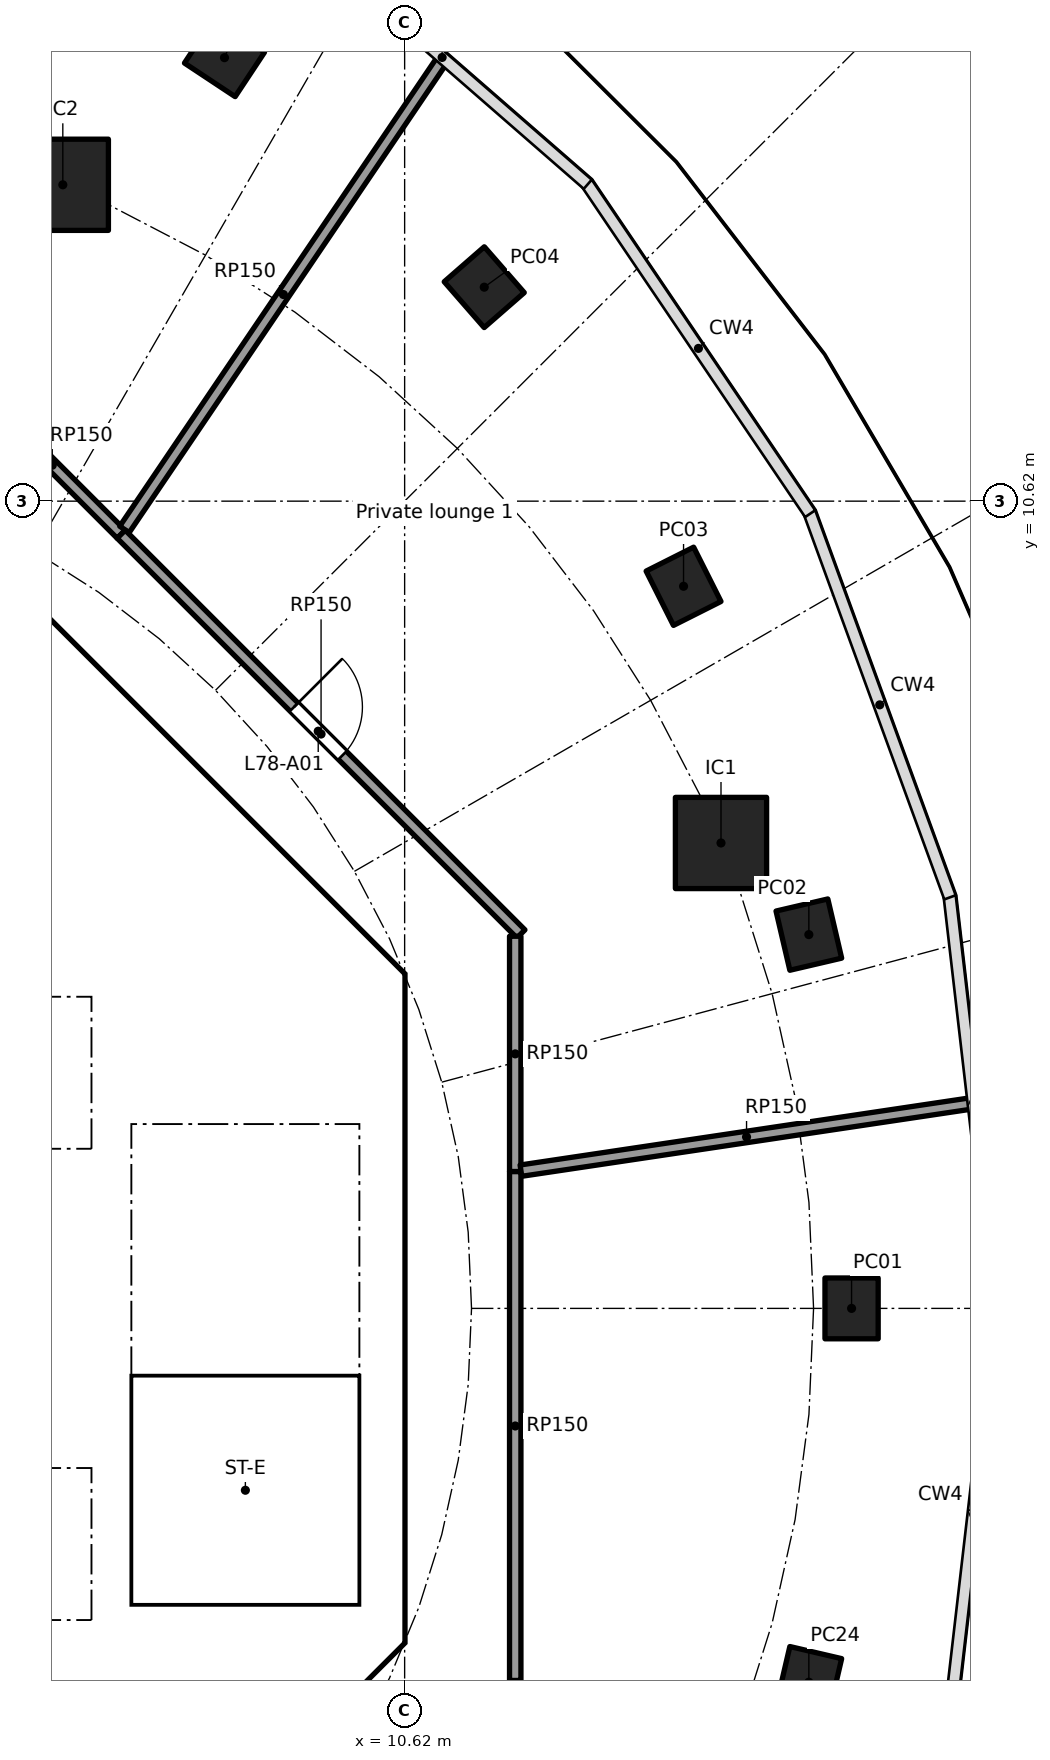
"""IFC4 building model, lengths in metres.
Left out: names, types, materials, properties, quantities, classifications, styles, units other than length and angle.
Written with IfcOpenShell. Run it as: python <this file> out.ifc"""

import sys

from ifc_helpers import new_model, si_unit, direction, frame, frame_2d, origin, origin_2d, place, context, subcontext, project, spatial, polyline, rectangle, hollow_rectangle, outline, extrude, element, fill, save


model = new_model("IFC4")
c1 = context("Model", 3, precision=1e-05, world=origin(), true_north=direction((0.0, 1.0)))
c2 = subcontext(c1, "Body", "Model", "MODEL_VIEW")
j1 = project(units=[si_unit("LENGTHUNIT", "METRE"), si_unit("PLANEANGLEUNIT", "RADIAN")], contexts=[c1])
p1 = place(None, origin())
s1 = spatial("IfcSite", under=j1, at=p1, CompositionType="ELEMENT")
p2 = place(p1, origin())
s2 = spatial("IfcBuilding", under=s1, at=p2, CompositionType="ELEMENT")
p3 = place(p2, frame((0.0, 0.0, 315.9)))
s3 = spatial("IfcBuildingStorey", under=s2, at=p3, CompositionType="ELEMENT", Elevation=315.9)
for number, where, z_axis, x_axis in (
    (1, (16.5, 0.0, -0.3), (0.0, 0.0, 1.0), (0.0, 1.0, 0.0)),
    (2, (15.938, 4.917, -0.3), (0.0, 0.0, 1.0), (-0.227, 0.974, 0.0)),
    (3, (14.289, 9.5, -0.3), (0.0, 0.0, 1.0), (-0.45, 0.893, 0.0)),
    (4, (11.667, 13.435, -0.3), (0.0, 0.0, 1.0), (-0.657, 0.754, 0.0)),
    (5, (8.25, 16.455, -0.3), (0.0, 0.0, 1.0), (-0.834, 0.552, 0.0)),
    (6, (15.938, -4.917, -0.3), (0.0, 0.0, 1.0), (0.227, 0.974, 0.0)),
):
    element("IfcColumn", number, at=place(p3, frame(where, z_axis=z_axis, x_axis=x_axis)), inside=s3, PredefinedType="COLUMN", context=c2, shape_type="SweptSolid", body=[
        extrude(hollow_rectangle(XDim=0.8, YDim=0.7, WallThickness=0.025, at=origin_2d()), origin(), (0.0, 0.0, 1.0), 4.8),
    ])
for number, where, z_axis, x_axis in (
    (7, (14.782, 6.123, 0.0), (0.0, 0.0, 1.0), (1.0, 0.0, 0.0)),
    (8, (6.123, 14.782, 0.0), (0.0, 0.0, 1.0), (1.0, 0.0, 0.0)),
):
    element("IfcColumn", number, at=place(p3, frame(where, z_axis=z_axis, x_axis=x_axis)), inside=s3, PredefinedType="COLUMN", context=c2, shape_type="SweptSolid", body=[
        extrude(rectangle(XDim=1.2, YDim=1.2, at=origin_2d()), origin(), (0.0, 0.0, 1.0), 4.5),
    ])
p4 = place(p3, frame((9.988, 4.613, 0.0), z_axis=(0.0, 0.0, 1.0), x_axis=(-0.707106781187, 0.707106781187, 0.0)))
e9 = element("IfcWall", 9, at=p4, inside=s3, PredefinedType="SHEAR", context=c2, shape_type="SweptSolid", body=[
    extrude(rectangle(XDim=7.602, YDim=0.6, at=frame_2d((3.801, 0.0))), origin(), (0.0, 0.0, 1.0), 4.2),
])
p5 = place(p4, frame((3.201, 0.0, 0.0)))
e10 = element("IfcOpeningElement", 10, at=p5, cuts=e9, PredefinedType="OPENING", context=c2, shape_type="SweptSolid", body=[
    extrude(rectangle(XDim=1.2, YDim=2.1, at=frame_2d((0.6, 1.05))), frame((0.0, 0.31, 0.0), z_axis=(0.0, -1.0, 0.0), x_axis=(1.0, 0.0, 0.0)), (0.0, 0.0, 1.0), 0.62),
])
p6 = place(p3, frame((4.613, -9.988, 0.0), z_axis=(0.0, 0.0, 1.0), x_axis=(0.707106781187, 0.707106781187, 0.0)))
e11 = element("IfcWall", 11, at=p6, inside=s3, PredefinedType="SHEAR", context=c2, shape_type="SweptSolid", body=[
    extrude(rectangle(XDim=7.602, YDim=0.6, at=frame_2d((3.801, 0.0))), origin(), (0.0, 0.0, 1.0), 4.2),
])
p7 = place(p6, frame((3.201, 0.0, 0.0)))
e12 = element("IfcOpeningElement", 12, at=p7, cuts=e11, PredefinedType="OPENING", context=c2, shape_type="SweptSolid", body=[
    extrude(rectangle(XDim=1.2, YDim=2.1, at=frame_2d((0.6, 1.05))), frame((0.0, 0.31, 0.0), z_axis=(0.0, -1.0, 0.0), x_axis=(1.0, 0.0, 0.0)), (0.0, 0.0, 1.0), 0.62),
])
p8 = place(p3, frame((-6.7, 2.0, 0.0), z_axis=(0.0, 0.0, 1.0), x_axis=(1.0, 0.0, 0.0)))
e13 = element("IfcWall", 13, at=p8, inside=s3, PredefinedType="SOLIDWALL", context=c2, shape_type="SweptSolid", body=[
    extrude(rectangle(XDim=13.4, YDim=0.2, at=frame_2d((6.7, 0.0))), origin(), (0.0, 0.0, 1.0), 4.2),
])
p9 = place(p8, frame((11.65, 0.0, 0.0)))
e14 = element("IfcOpeningElement", 14, at=p9, cuts=e13, PredefinedType="OPENING", context=c2, shape_type="SweptSolid", body=[
    extrude(rectangle(XDim=1.1, YDim=2.1, at=frame_2d((0.55, 1.05))), frame((0.0, 0.11, 0.0), z_axis=(0.0, -1.0, 0.0), x_axis=(1.0, 0.0, 0.0)), (0.0, 0.0, 1.0), 0.22),
])
p10 = place(p8, frame((0.75, 0.0, 0.0)))
e15 = element("IfcOpeningElement", 15, at=p10, cuts=e13, PredefinedType="OPENING", context=c2, shape_type="SweptSolid", body=[
    extrude(rectangle(XDim=0.9, YDim=2.1, at=frame_2d((0.45, 1.05))), frame((0.0, 0.11, 0.0), z_axis=(0.0, -1.0, 0.0), x_axis=(1.0, 0.0, 0.0)), (0.0, 0.0, 1.0), 0.22),
])
p11 = place(p8, frame((4.05, 0.0, 0.0)))
e16 = element("IfcOpeningElement", 16, at=p11, cuts=e13, PredefinedType="OPENING", context=c2, shape_type="SweptSolid", body=[
    extrude(rectangle(XDim=0.9, YDim=2.1, at=frame_2d((0.45, 1.05))), frame((0.0, 0.11, 0.0), z_axis=(0.0, -1.0, 0.0), x_axis=(1.0, 0.0, 0.0)), (0.0, 0.0, 1.0), 0.22),
])
p12 = place(p8, frame((7.35, 0.0, 0.0)))
e17 = element("IfcOpeningElement", 17, at=p12, cuts=e13, PredefinedType="OPENING", context=c2, shape_type="SweptSolid", body=[
    extrude(rectangle(XDim=0.9, YDim=2.1, at=frame_2d((0.45, 1.05))), frame((0.0, 0.11, 0.0), z_axis=(0.0, -1.0, 0.0), x_axis=(1.0, 0.0, 0.0)), (0.0, 0.0, 1.0), 0.22),
])
p13 = place(p8, frame((9.55, 0.0, 0.0)))
e18 = element("IfcOpeningElement", 18, at=p13, cuts=e13, PredefinedType="OPENING", context=c2, shape_type="SweptSolid", body=[
    extrude(rectangle(XDim=0.9, YDim=2.1, at=frame_2d((0.45, 1.05))), frame((0.0, 0.11, 0.0), z_axis=(0.0, -1.0, 0.0), x_axis=(1.0, 0.0, 0.0)), (0.0, 0.0, 1.0), 0.22),
])
p14 = place(p3, frame((6.7, 4.0, 0.0), z_axis=(0.0, 0.0, 1.0), x_axis=(1.0, 0.0, 0.0)))
e19 = element("IfcWall", 19, at=p14, inside=s3, PredefinedType="SOLIDWALL", context=c2, shape_type="SweptSolid", body=[
    extrude(rectangle(XDim=3.325, YDim=0.2, at=frame_2d((1.662, 0.0))), origin(), (0.0, 0.0, 1.0), 4.2),
])
p15 = place(p14, frame((1.25, 0.0, 0.0)))
e20 = element("IfcOpeningElement", 20, at=p15, cuts=e19, PredefinedType="OPENING", context=c2, shape_type="SweptSolid", body=[
    extrude(rectangle(XDim=1.1, YDim=2.1, at=frame_2d((0.55, 1.05))), frame((0.0, 0.11, 0.0), z_axis=(0.0, -1.0, 0.0), x_axis=(1.0, 0.0, 0.0)), (0.0, 0.0, 1.0), 0.22),
])
p16 = place(p3, frame((-6.7, -2.0, 0.0), z_axis=(0.0, 0.0, 1.0), x_axis=(1.0, 0.0, 0.0)))
e21 = element("IfcWall", 21, at=p16, inside=s3, PredefinedType="SOLIDWALL", context=c2, shape_type="SweptSolid", body=[
    extrude(rectangle(XDim=13.4, YDim=0.2, at=frame_2d((6.7, 0.0))), origin(), (0.0, 0.0, 1.0), 4.2),
])
p17 = place(p16, frame((9.45, 0.0, 0.0)))
e22 = element("IfcOpeningElement", 22, at=p17, cuts=e21, PredefinedType="OPENING", context=c2, shape_type="SweptSolid", body=[
    extrude(rectangle(XDim=1.1, YDim=2.1, at=frame_2d((0.55, 1.05))), frame((0.0, 0.11, 0.0), z_axis=(0.0, -1.0, 0.0), x_axis=(1.0, 0.0, 0.0)), (0.0, 0.0, 1.0), 0.22),
])
p18 = place(p16, frame((11.65, 0.0, 0.0)))
e23 = element("IfcOpeningElement", 23, at=p18, cuts=e21, PredefinedType="OPENING", context=c2, shape_type="SweptSolid", body=[
    extrude(rectangle(XDim=1.1, YDim=2.1, at=frame_2d((0.55, 1.05))), frame((0.0, 0.11, 0.0), z_axis=(0.0, -1.0, 0.0), x_axis=(1.0, 0.0, 0.0)), (0.0, 0.0, 1.0), 0.22),
])
p19 = place(p16, frame((1.85, 0.0, 0.0)))
e24 = element("IfcOpeningElement", 24, at=p19, cuts=e21, PredefinedType="OPENING", context=c2, shape_type="SweptSolid", body=[
    extrude(rectangle(XDim=0.9, YDim=2.1, at=frame_2d((0.45, 1.05))), frame((0.0, 0.11, 0.0), z_axis=(0.0, -1.0, 0.0), x_axis=(1.0, 0.0, 0.0)), (0.0, 0.0, 1.0), 0.22),
])
p20 = place(p16, frame((6.25, 0.0, 0.0)))
e25 = element("IfcOpeningElement", 25, at=p20, cuts=e21, PredefinedType="OPENING", context=c2, shape_type="SweptSolid", body=[
    extrude(rectangle(XDim=0.9, YDim=2.1, at=frame_2d((0.45, 1.05))), frame((0.0, 0.11, 0.0), z_axis=(0.0, -1.0, 0.0), x_axis=(1.0, 0.0, 0.0)), (0.0, 0.0, 1.0), 0.22),
])
p21 = place(p3, origin())
e26 = element("IfcWall", 26, at=p21, inside=s3, PredefinedType="SHEAR", context=c2, shape_type="SweptSolid", body=[
    extrude(outline(polyline([(9.776, -4.401), (10.025, -4.152), (10.025, -3.801), (10.025, 4.152), (9.776, 4.401), (10.2, 4.825), (10.625, 4.401), (10.625, -4.401), (10.2, -4.825), (9.776, -4.401)])), origin(), (0.0, 0.0, 1.0), 4.2),
])
p22 = place(p3, origin())
e27 = element("IfcWall", 27, at=p22, inside=s3, PredefinedType="SOLIDWALL", context=c2, shape_type="SweptSolid", body=[
    extrude(outline(polyline([(-6.7, 4.3), (6.7, 4.3), (6.7, 2.1), (6.5, 2.1), (6.5, 4.1), (4.5, 4.1), (4.5, 2.1), (4.3, 2.1), (4.3, 4.1), (2.3, 4.1), (2.3, 2.1), (2.1, 2.1), (2.1, 4.1), (0.1, 4.1), (0.1, 2.1), (-0.1, 2.1), (-0.1, 4.1), (-4.3, 4.1), (-4.3, 2.1), (-4.5, 2.1), (-4.5, 4.1), (-6.5, 4.1), (-6.5, 2.1), (-6.7, 2.1), (-6.7, 4.3)])), origin(), (0.0, 0.0, 1.0), 4.2),
])
p23 = place(p3, origin())
e28 = element("IfcWall", 28, at=p23, inside=s3, PredefinedType="SOLIDWALL", context=c2, shape_type="SweptSolid", body=[
    extrude(outline(polyline([(-6.7, -2.1), (-6.5, -2.1), (-6.5, -4.1), (-2.3, -4.1), (-2.3, -2.1), (-2.1, -2.1), (-2.1, -4.1), (2.1, -4.1), (2.1, -2.1), (2.3, -2.1), (2.3, -4.1), (4.3, -4.1), (4.3, -2.1), (4.5, -2.1), (4.5, -4.1), (6.5, -4.1), (6.5, -2.1), (6.7, -2.1), (6.7, -4.3), (-6.7, -4.3), (-6.7, -2.1)])), origin(), (0.0, 0.0, 1.0), 4.2),
])
p24 = place(p3, origin())
e29 = element("IfcWall", 29, at=p24, inside=s3, PredefinedType="SOLIDWALL", context=c2, shape_type="SweptSolid", body=[
    extrude(outline(polyline([(7.025, -3.9), (6.7, -3.9), (6.7, 3.9), (7.025, 3.9), (7.025, -3.9)])), origin(), (0.0, 0.0, 1.0), 4.2),
])
p25 = place(p3, origin())
e30 = element("IfcWall", 30, at=p25, inside=s3, PredefinedType="SOLIDWALL", context=c2, shape_type="SweptSolid", body=[
    extrude(outline(polyline([(10.025, -4.1), (6.7, -4.1), (6.7, -3.9), (10.025, -3.9), (10.025, -4.1)])), origin(), (0.0, 0.0, 1.0), 4.2),
])
p26 = place(p3, frame((5.077, 12.0, 0.0), z_axis=(0.0, 0.0, 1.0), x_axis=(0.706964061082, -0.707249472491, 0.0)))
e31 = element("IfcWall", 31, at=p26, inside=s3, PredefinedType="PARTITIONING", context=c2, shape_type="SweptSolid", body=[
    extrude(rectangle(XDim=2.566, YDim=0.15, at=frame_2d((1.283, 0.0))), origin(), (0.0, 0.0, 1.0), 4.2),
])
p27 = place(p3, frame((6.934, 10.248, 0.0), z_axis=(0.0, 0.0, 1.0), x_axis=(0.56046251301, 0.828179794194, 0.0)))
e32 = element("IfcWall", 32, at=p27, inside=s3, PredefinedType="PARTITIONING", context=c2, shape_type="SweptSolid", body=[
    extrude(rectangle(XDim=7.462, YDim=0.15, at=frame_2d((3.731, 0.0))), origin(), (0.0, 0.0, 1.0), 4.2),
])
p28 = place(p3, frame((6.891, 10.185, 0.0), z_axis=(0.0, 0.0, 1.0), x_axis=(0.70715602432, -0.707057534623, 0.0)))
e33 = element("IfcWall", 33, at=p28, inside=s3, PredefinedType="PARTITIONING", context=c2, shape_type="SweptSolid", body=[
    extrude(rectangle(XDim=7.437, YDim=0.15, at=frame_2d((3.718, 0.0))), origin(), (0.0, 0.0, 1.0), 4.2),
])
p29 = place(p28, frame((3.215, 0.0, 0.0)))
e34 = element("IfcOpeningElement", 34, at=p29, cuts=e33, PredefinedType="OPENING", context=c2, shape_type="SweptSolid", body=[
    extrude(rectangle(XDim=0.9, YDim=2.1, at=frame_2d((0.45, 1.05))), frame((0.0, 0.085, 0.0), z_axis=(0.0, -1.0, 0.0), x_axis=(1.0, 0.0, 0.0)), (0.0, 0.0, 1.0), 0.17),
])
p30 = place(p3, frame((12.15, -4.926, 0.0), z_axis=(0.0, 0.0, 1.0), x_axis=(-0.707057968072, -0.707155590932, 0.0)))
e35 = element("IfcWall", 35, at=p30, inside=s3, PredefinedType="PARTITIONING", context=c2, shape_type="SweptSolid", body=[
    extrude(rectangle(XDim=10.003, YDim=0.15, at=frame_2d((5.002, 0.0))), origin(), (0.0, 0.0, 1.0), 4.2),
])
p31 = place(p30, frame((4.658, 0.0, 0.0)))
e36 = element("IfcOpeningElement", 36, at=p31, cuts=e35, PredefinedType="OPENING", context=c2, shape_type="SweptSolid", body=[
    extrude(rectangle(XDim=0.9, YDim=2.1, at=frame_2d((0.45, 1.05))), frame((0.0, 0.085, 0.0), z_axis=(0.0, -1.0, 0.0), x_axis=(1.0, 0.0, 0.0)), (0.0, 0.0, 1.0), 0.17),
])
p32 = place(p3, frame((12.075, 1.801, 0.0), z_axis=(0.0, 0.0, 1.0), x_axis=(0.0, -1.0, 0.0)))
e37 = element("IfcWall", 37, at=p32, inside=s3, PredefinedType="PARTITIONING", context=c2, shape_type="SweptSolid", body=[
    extrude(rectangle(XDim=6.696, YDim=0.15, at=frame_2d((3.348, 0.0))), origin(), (0.0, 0.0, 1.0), 4.2),
])
p33 = place(p3, frame((12.075, 4.896, 0.0), z_axis=(0.0, 0.0, 1.0), x_axis=(0.0, -1.0, 0.0)))
e38 = element("IfcWall", 38, at=p33, inside=s3, PredefinedType="PARTITIONING", context=c2, shape_type="SweptSolid", body=[
    extrude(rectangle(XDim=3.095, YDim=0.15, at=frame_2d((1.547, 0.0))), origin(), (0.0, 0.0, 1.0), 4.2),
])
p34 = place(p3, frame((18.086, 2.698, 0.0), z_axis=(0.0, 0.0, 1.0), x_axis=(-0.989039934914, -0.147648254801, 0.0)))
e39 = element("IfcWall", 39, at=p34, inside=s3, PredefinedType="PARTITIONING", context=c2, shape_type="SweptSolid", body=[
    extrude(rectangle(XDim=6.002, YDim=0.15, at=frame_2d((3.001, 0.0))), origin(), (0.0, 0.0, 1.0), 4.2),
])
p35 = place(p9, origin())
e40 = element("IfcDoor", 40, at=p35, inside=s3, OperationType="DOUBLE_DOOR_SLIDING", PredefinedType="DOOR", context=c2, shape_type="SweptSolid", body=[
    extrude(rectangle(XDim=1.1, YDim=2.1, at=frame_2d((0.55, 1.05))), frame((0.0, 0.025, 0.0), z_axis=(0.0, -1.0, 0.0), x_axis=(1.0, 0.0, 0.0)), (0.0, 0.0, 1.0), 0.05),
])
fill(e14, e40)
p36 = place(p18, origin())
e41 = element("IfcDoor", 41, at=p36, inside=s3, OperationType="DOUBLE_DOOR_SLIDING", PredefinedType="DOOR", context=c2, shape_type="SweptSolid", body=[
    extrude(rectangle(XDim=1.1, YDim=2.1, at=frame_2d((0.55, 1.05))), frame((0.0, 0.025, 0.0), z_axis=(0.0, -1.0, 0.0), x_axis=(1.0, 0.0, 0.0)), (0.0, 0.0, 1.0), 0.05),
])
fill(e23, e41)
p37 = place(p15, frame((1.1, 0.0, 0.0), x_axis=(-1.0, 0.0, 0.0)))
e42 = element("IfcDoor", 42, at=p37, inside=s3, OperationType="SINGLE_SWING_LEFT", PredefinedType="DOOR", context=c2, shape_type="SweptSolid", body=[
    extrude(rectangle(XDim=1.1, YDim=2.1, at=frame_2d((0.55, 1.05))), frame((0.0, 0.025, 0.0), z_axis=(0.0, -1.0, 0.0), x_axis=(1.0, 0.0, 0.0)), (0.0, 0.0, 1.0), 0.05),
])
fill(e20, e42)
p38 = place(p5, origin())
e43 = element("IfcDoor", 43, at=p38, inside=s3, OperationType="SINGLE_SWING_LEFT", PredefinedType="DOOR", context=c2, shape_type="SweptSolid", body=[
    extrude(rectangle(XDim=1.2, YDim=2.1, at=frame_2d((0.6, 1.05))), frame((0.0, 0.025, 0.0), z_axis=(0.0, -1.0, 0.0), x_axis=(1.0, 0.0, 0.0)), (0.0, 0.0, 1.0), 0.05),
])
fill(e10, e43)
p39 = place(p29, origin())
e44 = element("IfcDoor", 44, at=p39, inside=s3, OperationType="SINGLE_SWING_LEFT", PredefinedType="DOOR", context=c2, shape_type="SweptSolid", body=[
    extrude(rectangle(XDim=0.9, YDim=2.1, at=frame_2d((0.45, 1.05))), frame((0.0, 0.025, 0.0), z_axis=(0.0, -1.0, 0.0), x_axis=(1.0, 0.0, 0.0)), (0.0, 0.0, 1.0), 0.05),
])
fill(e34, e44)
save(model, sys.argv[1])
